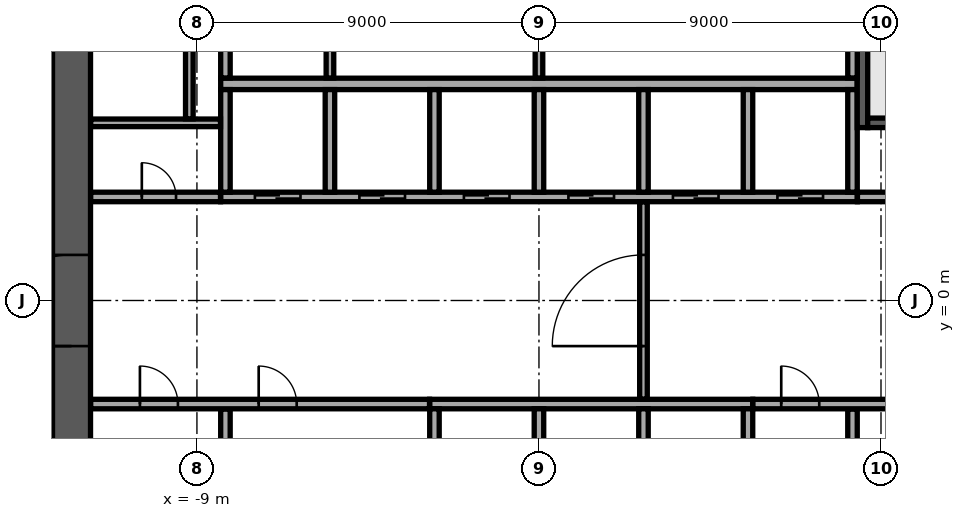
"""IFC4 building model, lengths in metres.
Left out: names, types, materials, properties, quantities, classifications, styles, units other than length and angle.
Written with IfcOpenShell. Run it as: python <this file> out.ifc"""

import sys

from ifc_helpers import new_model, si_unit, direction, frame, frame_2d, origin, place, context, subcontext, project, spatial, rectangle, extrude, element, fill, save


model = new_model("IFC4")
c1 = context("Model", 3, precision=1e-05, world=origin(), true_north=direction((0.0, 1.0)))
c2 = subcontext(c1, "Body", "Model", "MODEL_VIEW")
j1 = project(units=[si_unit("LENGTHUNIT", "METRE"), si_unit("PLANEANGLEUNIT", "RADIAN")], contexts=[c1])
p1 = place(None, origin())
s1 = spatial("IfcSite", under=j1, at=p1, CompositionType="ELEMENT")
p2 = place(p1, origin())
s2 = spatial("IfcBuilding", under=s1, at=p2, CompositionType="ELEMENT")
p3 = place(p2, frame((0.0, 0.0, 139.7)))
s3 = spatial("IfcBuildingStorey", under=s2, at=p3, CompositionType="ELEMENT", Elevation=139.7)
p4 = place(p3, frame((-12.3, -11.8, 0.0), z_axis=(0.0, 0.0, 1.0), x_axis=(0.0, 1.0, 0.0)))
e1 = element("IfcWall", 1, at=p4, inside=s3, PredefinedType="SHEAR", context=c2, shape_type="SweptSolid", body=[
    extrude(rectangle(XDim=23.6, YDim=1.0, at=frame_2d((11.8, 0.0))), origin(), (0.0, 0.0, 1.0), 3.6),
])
p5 = place(p4, frame((10.6, 0.0, 0.0)))
e2 = element("IfcOpeningElement", 2, at=p5, cuts=e1, PredefinedType="OPENING", context=c2, shape_type="SweptSolid", body=[
    extrude(rectangle(XDim=2.4, YDim=2.4, at=frame_2d((1.2, 1.2))), frame((0.0, 0.51, 0.0), z_axis=(0.0, -1.0, 0.0), x_axis=(1.0, 0.0, 0.0)), (0.0, 0.0, 1.0), 1.02),
])
p6 = place(p3, frame((-8.375, 5.7, 0.0), z_axis=(0.0, 0.0, 1.0), x_axis=(1.0, 0.0, 0.0)))
e3 = element("IfcWall", 3, at=p6, inside=s3, PredefinedType="SOLIDWALL", context=c2, shape_type="SweptSolid", body=[
    extrude(rectangle(XDim=16.75, YDim=0.3, at=frame_2d((8.375, 0.0))), origin(), (0.0, 0.0, 1.0), 3.6),
])
p7 = place(p3, frame((-8.375, 2.725, 0.0), z_axis=(0.0, 0.0, 1.0), x_axis=(1.0, 0.0, 0.0)))
e4 = element("IfcWall", 4, at=p7, inside=s3, PredefinedType="SOLIDWALL", context=c2, shape_type="SweptSolid", body=[
    extrude(rectangle(XDim=16.75, YDim=0.25, at=frame_2d((8.375, 0.0))), origin(), (0.0, 0.0, 1.0), 3.6),
])
p8 = place(p7, frame((0.9, 0.0, 0.0)))
e5 = element("IfcOpeningElement", 5, at=p8, cuts=e4, PredefinedType="OPENING", context=c2, shape_type="SweptSolid", body=[
    extrude(rectangle(XDim=1.2, YDim=2.1, at=frame_2d((0.6, 1.05))), frame((0.0, 0.135, 0.0), z_axis=(0.0, -1.0, 0.0), x_axis=(1.0, 0.0, 0.0)), (0.0, 0.0, 1.0), 0.27),
])
p9 = place(p7, frame((3.65, 0.0, 0.0)))
e6 = element("IfcOpeningElement", 6, at=p9, cuts=e4, PredefinedType="OPENING", context=c2, shape_type="SweptSolid", body=[
    extrude(rectangle(XDim=1.2, YDim=2.1, at=frame_2d((0.6, 1.05))), frame((0.0, 0.135, 0.0), z_axis=(0.0, -1.0, 0.0), x_axis=(1.0, 0.0, 0.0)), (0.0, 0.0, 1.0), 0.27),
])
p10 = place(p7, frame((6.4, 0.0, 0.0)))
e7 = element("IfcOpeningElement", 7, at=p10, cuts=e4, PredefinedType="OPENING", context=c2, shape_type="SweptSolid", body=[
    extrude(rectangle(XDim=1.2, YDim=2.1, at=frame_2d((0.6, 1.05))), frame((0.0, 0.135, 0.0), z_axis=(0.0, -1.0, 0.0), x_axis=(1.0, 0.0, 0.0)), (0.0, 0.0, 1.0), 0.27),
])
p11 = place(p7, frame((9.15, 0.0, 0.0)))
e8 = element("IfcOpeningElement", 8, at=p11, cuts=e4, PredefinedType="OPENING", context=c2, shape_type="SweptSolid", body=[
    extrude(rectangle(XDim=1.2, YDim=2.1, at=frame_2d((0.6, 1.05))), frame((0.0, 0.135, 0.0), z_axis=(0.0, -1.0, 0.0), x_axis=(1.0, 0.0, 0.0)), (0.0, 0.0, 1.0), 0.27),
])
p12 = place(p7, frame((11.9, 0.0, 0.0)))
e9 = element("IfcOpeningElement", 9, at=p12, cuts=e4, PredefinedType="OPENING", context=c2, shape_type="SweptSolid", body=[
    extrude(rectangle(XDim=1.2, YDim=2.1, at=frame_2d((0.6, 1.05))), frame((0.0, 0.135, 0.0), z_axis=(0.0, -1.0, 0.0), x_axis=(1.0, 0.0, 0.0)), (0.0, 0.0, 1.0), 0.27),
])
p13 = place(p7, frame((14.65, 0.0, 0.0)))
e10 = element("IfcOpeningElement", 10, at=p13, cuts=e4, PredefinedType="OPENING", context=c2, shape_type="SweptSolid", body=[
    extrude(rectangle(XDim=1.2, YDim=2.1, at=frame_2d((0.6, 1.05))), frame((0.0, 0.135, 0.0), z_axis=(0.0, -1.0, 0.0), x_axis=(1.0, 0.0, 0.0)), (0.0, 0.0, 1.0), 0.27),
])
for number, where, z_axis, x_axis in (
    (11, (-8.25, 2.85, 0.0), (0.0, 0.0, 1.0), (0.0, 1.0, 0.0)),
    (12, (-5.5, 2.85, 0.0), (0.0, 0.0, 1.0), (0.0, 1.0, 0.0)),
    (13, (-2.75, 2.85, 0.0), (0.0, 0.0, 1.0), (0.0, 1.0, 0.0)),
    (14, (0.0, 2.85, 0.0), (0.0, 0.0, 1.0), (0.0, 1.0, 0.0)),
    (15, (2.75, 2.85, 0.0), (0.0, 0.0, 1.0), (0.0, 1.0, 0.0)),
    (16, (5.5, 2.85, 0.0), (0.0, 0.0, 1.0), (0.0, 1.0, 0.0)),
    (17, (8.25, 2.85, 0.0), (0.0, 0.0, 1.0), (0.0, 1.0, 0.0)),
):
    element("IfcWall", number, at=place(p3, frame(where, z_axis=z_axis, x_axis=x_axis)), inside=s3, PredefinedType="SOLIDWALL", context=c2, shape_type="SweptSolid", body=[
        extrude(rectangle(XDim=2.7, YDim=0.25, at=frame_2d((1.35, 0.0))), origin(), (0.0, 0.0, 1.0), 3.6),
    ])
p14 = place(p3, frame((-2.875, -2.725, 0.0), z_axis=(0.0, 0.0, 1.0), x_axis=(1.0, 0.0, 0.0)))
e18 = element("IfcWall", 18, at=p14, inside=s3, PredefinedType="SOLIDWALL", context=c2, shape_type="SweptSolid", body=[
    extrude(rectangle(XDim=8.5, YDim=0.25, at=frame_2d((4.25, 0.0))), origin(), (0.0, 0.0, 1.0), 3.6),
])
for number, where, z_axis, x_axis in (
    (19, (-2.75, -5.55, 0.0), (0.0, 0.0, 1.0), (0.0, 1.0, 0.0)),
    (20, (0.0, -5.55, 0.0), (0.0, 0.0, 1.0), (0.0, 1.0, 0.0)),
    (21, (2.75, -5.55, 0.0), (0.0, 0.0, 1.0), (0.0, 1.0, 0.0)),
    (22, (5.5, -5.55, 0.0), (0.0, 0.0, 1.0), (0.0, 1.0, 0.0)),
):
    element("IfcWall", number, at=place(p3, frame(where, z_axis=z_axis, x_axis=x_axis)), inside=s3, PredefinedType="SOLIDWALL", context=c2, shape_type="SweptSolid", body=[
        extrude(rectangle(XDim=2.7, YDim=0.25, at=frame_2d((1.35, 0.0))), origin(), (0.0, 0.0, 1.0), 3.6),
    ])
p15 = place(p3, frame((8.512, 4.55, 0.0), z_axis=(0.0, 0.0, 1.0), x_axis=(0.0, 1.0, 0.0)))
e23 = element("IfcWall", 23, at=p15, inside=s3, PredefinedType="SOLIDWALL", context=c2, shape_type="SweptSolid", body=[
    extrude(rectangle(XDim=7.25, YDim=0.275, at=frame_2d((3.625, 0.0))), origin(), (0.0, 0.0, 1.0), 3.6),
])
p16 = place(p15, frame((6.0, 0.0, 0.0)))
e24 = element("IfcOpeningElement", 24, at=p16, cuts=e23, PredefinedType="OPENING", context=c2, shape_type="SweptSolid", body=[
    extrude(rectangle(XDim=1.0, YDim=2.1, at=frame_2d((0.5, 1.05))), frame((0.0, 0.147, 0.0), z_axis=(0.0, -1.0, 0.0), x_axis=(1.0, 0.0, 0.0)), (0.0, 0.0, 1.0), 0.295),
])
p17 = place(p3, frame((8.65, 4.675, 0.0), z_axis=(0.0, 0.0, 1.0), x_axis=(1.0, 0.0, 0.0)))
e25 = element("IfcWall", 25, at=p17, inside=s3, PredefinedType="SOLIDWALL", context=c2, shape_type="SweptSolid", body=[
    extrude(rectangle(XDim=3.15, YDim=0.25, at=frame_2d((1.575, 0.0))), origin(), (0.0, 0.0, 1.0), 3.6),
])
for number, where, z_axis, x_axis in (
    (26, (-8.25, -5.545, 0.0), (0.0, 0.0, 1.0), (0.0, 1.0, 0.0)),
    (27, (8.25, -5.545, 0.0), (0.0, 0.0, 1.0), (0.0, 1.0, 0.0)),
):
    element("IfcWall", number, at=place(p3, frame(where, z_axis=z_axis, x_axis=x_axis)), inside=s3, PredefinedType="PARTITIONING", context=c2, shape_type="SweptSolid", body=[
        extrude(rectangle(XDim=2.69, YDim=0.25, at=frame_2d((1.345, 0.0))), origin(), (0.0, 0.0, 1.0), 3.6),
    ])
p18 = place(p3, frame((-11.795, -2.725, 0.0), z_axis=(0.0, 0.0, 1.0), x_axis=(1.0, 0.0, 0.0)))
e28 = element("IfcWall", 28, at=p18, inside=s3, PredefinedType="PARTITIONING", context=c2, shape_type="SweptSolid", body=[
    extrude(rectangle(XDim=8.915, YDim=0.25, at=frame_2d((4.458, 0.0))), origin(), (0.0, 0.0, 1.0), 3.6),
])
p19 = place(p18, frame((1.295, 0.0, 0.0)))
e29 = element("IfcOpeningElement", 29, at=p19, cuts=e28, PredefinedType="OPENING", context=c2, shape_type="SweptSolid", body=[
    extrude(rectangle(XDim=1.0, YDim=2.1, at=frame_2d((0.5, 1.05))), frame((0.0, 0.135, 0.0), z_axis=(0.0, -1.0, 0.0), x_axis=(1.0, 0.0, 0.0)), (0.0, 0.0, 1.0), 0.27),
])
p20 = place(p18, frame((4.42, 0.0, 0.0)))
e30 = element("IfcOpeningElement", 30, at=p20, cuts=e28, PredefinedType="OPENING", context=c2, shape_type="SweptSolid", body=[
    extrude(rectangle(XDim=1.0, YDim=2.1, at=frame_2d((0.5, 1.05))), frame((0.0, 0.135, 0.0), z_axis=(0.0, -1.0, 0.0), x_axis=(1.0, 0.0, 0.0)), (0.0, 0.0, 1.0), 0.27),
])
p21 = place(p3, frame((5.63, -2.725, 0.0), z_axis=(0.0, 0.0, 1.0), x_axis=(1.0, 0.0, 0.0)))
e31 = element("IfcWall", 31, at=p21, inside=s3, PredefinedType="PARTITIONING", context=c2, shape_type="SweptSolid", body=[
    extrude(rectangle(XDim=6.165, YDim=0.25, at=frame_2d((3.083, 0.0))), origin(), (0.0, 0.0, 1.0), 3.6),
])
p22 = place(p21, frame((0.745, 0.0, 0.0)))
e32 = element("IfcOpeningElement", 32, at=p22, cuts=e31, PredefinedType="OPENING", context=c2, shape_type="SweptSolid", body=[
    extrude(rectangle(XDim=1.0, YDim=2.1, at=frame_2d((0.5, 1.05))), frame((0.0, 0.135, 0.0), z_axis=(0.0, -1.0, 0.0), x_axis=(1.0, 0.0, 0.0)), (0.0, 0.0, 1.0), 0.27),
])
p23 = place(p21, frame((3.92, 0.0, 0.0)))
e33 = element("IfcOpeningElement", 33, at=p23, cuts=e31, PredefinedType="OPENING", context=c2, shape_type="SweptSolid", body=[
    extrude(rectangle(XDim=0.9, YDim=2.1, at=frame_2d((0.45, 1.05))), frame((0.0, 0.135, 0.0), z_axis=(0.0, -1.0, 0.0), x_axis=(1.0, 0.0, 0.0)), (0.0, 0.0, 1.0), 0.27),
])
p24 = place(p3, frame((2.75, -2.595, 0.0), z_axis=(0.0, 0.0, 1.0), x_axis=(0.0, 1.0, 0.0)))
e34 = element("IfcWall", 34, at=p24, inside=s3, PredefinedType="PARTITIONING", context=c2, shape_type="SweptSolid", body=[
    extrude(rectangle(XDim=5.19, YDim=0.2, at=frame_2d((2.595, 0.0))), origin(), (0.0, 0.0, 1.0), 3.6),
])
p25 = place(p24, frame((1.395, 0.0, 0.0)))
e35 = element("IfcOpeningElement", 35, at=p25, cuts=e34, PredefinedType="OPENING", context=c2, shape_type="SweptSolid", body=[
    extrude(rectangle(XDim=2.4, YDim=2.4, at=frame_2d((1.2, 1.2))), frame((0.0, 0.11, 0.0), z_axis=(0.0, -1.0, 0.0), x_axis=(1.0, 0.0, 0.0)), (0.0, 0.0, 1.0), 0.22),
])
p26 = place(p3, frame((-11.795, 2.725, 0.0), z_axis=(0.0, 0.0, 1.0), x_axis=(1.0, 0.0, 0.0)))
e36 = element("IfcWall", 36, at=p26, inside=s3, PredefinedType="PARTITIONING", context=c2, shape_type="SweptSolid", body=[
    extrude(rectangle(XDim=3.415, YDim=0.25, at=frame_2d((1.708, 0.0))), origin(), (0.0, 0.0, 1.0), 3.6),
])
p27 = place(p26, frame((1.345, 0.0, 0.0)))
e37 = element("IfcOpeningElement", 37, at=p27, cuts=e36, PredefinedType="OPENING", context=c2, shape_type="SweptSolid", body=[
    extrude(rectangle(XDim=0.9, YDim=2.1, at=frame_2d((0.45, 1.05))), frame((0.0, 0.135, 0.0), z_axis=(0.0, -1.0, 0.0), x_axis=(1.0, 0.0, 0.0)), (0.0, 0.0, 1.0), 0.27),
])
p28 = place(p3, frame((8.38, 2.725, 0.0), z_axis=(0.0, 0.0, 1.0), x_axis=(1.0, 0.0, 0.0)))
e38 = element("IfcWall", 38, at=p28, inside=s3, PredefinedType="PARTITIONING", context=c2, shape_type="SweptSolid", body=[
    extrude(rectangle(XDim=3.415, YDim=0.25, at=frame_2d((1.708, 0.0))), origin(), (0.0, 0.0, 1.0), 3.6),
])
p29 = place(p28, frame((1.17, 0.0, 0.0)))
e39 = element("IfcOpeningElement", 39, at=p29, cuts=e38, PredefinedType="OPENING", context=c2, shape_type="SweptSolid", body=[
    extrude(rectangle(XDim=0.9, YDim=2.1, at=frame_2d((0.45, 1.05))), frame((0.0, 0.135, 0.0), z_axis=(0.0, -1.0, 0.0), x_axis=(1.0, 0.0, 0.0)), (0.0, 0.0, 1.0), 0.27),
])
p30 = place(p3, frame((-11.795, 4.675, 0.0), z_axis=(0.0, 0.0, 1.0), x_axis=(1.0, 0.0, 0.0)))
e40 = element("IfcWall", 40, at=p30, inside=s3, PredefinedType="PARTITIONING", context=c2, shape_type="SweptSolid", body=[
    extrude(rectangle(XDim=3.415, YDim=0.2, at=frame_2d((1.708, 0.0))), origin(), (0.0, 0.0, 1.0), 3.6),
])
p31 = place(p3, frame((-9.2, 4.78, 0.0), z_axis=(0.0, 0.0, 1.0), x_axis=(0.0, 1.0, 0.0)))
e41 = element("IfcWall", 41, at=p31, inside=s3, PredefinedType="PARTITIONING", context=c2, shape_type="SweptSolid", body=[
    extrude(rectangle(XDim=7.015, YDim=0.2, at=frame_2d((3.507, 0.0))), origin(), (0.0, 0.0, 1.0), 3.6),
])
p32 = place(p31, frame((2.92, 0.0, 0.0)))
e42 = element("IfcOpeningElement", 42, at=p32, cuts=e41, PredefinedType="OPENING", context=c2, shape_type="SweptSolid", body=[
    extrude(rectangle(XDim=1.0, YDim=2.1, at=frame_2d((0.5, 1.05))), frame((0.0, 0.11, 0.0), z_axis=(0.0, -1.0, 0.0), x_axis=(1.0, 0.0, 0.0)), (0.0, 0.0, 1.0), 0.22),
])
p33 = place(p3, frame((-8.25, 5.855, 0.0), z_axis=(0.0, 0.0, 1.0), x_axis=(0.0, 1.0, 0.0)))
e43 = element("IfcWall", 43, at=p33, inside=s3, PredefinedType="PARTITIONING", context=c2, shape_type="SweptSolid", body=[
    extrude(rectangle(XDim=2.69, YDim=0.25, at=frame_2d((1.345, 0.0))), origin(), (0.0, 0.0, 1.0), 3.6),
])
for number, where, z_axis, x_axis in (
    (44, (-5.5, 5.855, 0.0), (0.0, 0.0, 1.0), (0.0, 1.0, 0.0)),
    (45, (0.0, 5.855, 0.0), (0.0, 0.0, 1.0), (0.0, 1.0, 0.0)),
):
    element("IfcWall", number, at=place(p3, frame(where, z_axis=z_axis, x_axis=x_axis)), inside=s3, PredefinedType="PARTITIONING", context=c2, shape_type="SweptSolid", body=[
        extrude(rectangle(XDim=2.69, YDim=0.2, at=frame_2d((1.345, 0.0))), origin(), (0.0, 0.0, 1.0), 3.6),
    ])
p34 = place(p3, frame((8.25, 5.855, 0.0), z_axis=(0.0, 0.0, 1.0), x_axis=(0.0, 1.0, 0.0)))
e46 = element("IfcWall", 46, at=p34, inside=s3, PredefinedType="PARTITIONING", context=c2, shape_type="SweptSolid", body=[
    extrude(rectangle(XDim=2.69, YDim=0.25, at=frame_2d((1.345, 0.0))), origin(), (0.0, 0.0, 1.0), 3.6),
])
p35 = place(p5, origin())
e47 = element("IfcDoor", 47, at=p35, inside=s3, OperationType="SINGLE_SWING_LEFT", PredefinedType="DOOR", context=c2, shape_type="SweptSolid", body=[
    extrude(rectangle(XDim=2.4, YDim=2.4, at=frame_2d((1.2, 1.2))), frame((0.0, 0.025, 0.0), z_axis=(0.0, -1.0, 0.0), x_axis=(1.0, 0.0, 0.0)), (0.0, 0.0, 1.0), 0.05),
])
fill(e2, e47)
p36 = place(p8, origin())
e48 = element("IfcDoor", 48, at=p36, inside=s3, OperationType="DOUBLE_DOOR_SLIDING", PredefinedType="DOOR", context=c2, shape_type="SweptSolid", body=[
    extrude(rectangle(XDim=1.2, YDim=2.1, at=frame_2d((0.6, 1.05))), frame((0.0, 0.025, 0.0), z_axis=(0.0, -1.0, 0.0), x_axis=(1.0, 0.0, 0.0)), (0.0, 0.0, 1.0), 0.05),
])
fill(e5, e48)
p37 = place(p9, origin())
e49 = element("IfcDoor", 49, at=p37, inside=s3, OperationType="DOUBLE_DOOR_SLIDING", PredefinedType="DOOR", context=c2, shape_type="SweptSolid", body=[
    extrude(rectangle(XDim=1.2, YDim=2.1, at=frame_2d((0.6, 1.05))), frame((0.0, 0.025, 0.0), z_axis=(0.0, -1.0, 0.0), x_axis=(1.0, 0.0, 0.0)), (0.0, 0.0, 1.0), 0.05),
])
fill(e6, e49)
p38 = place(p10, origin())
e50 = element("IfcDoor", 50, at=p38, inside=s3, OperationType="DOUBLE_DOOR_SLIDING", PredefinedType="DOOR", context=c2, shape_type="SweptSolid", body=[
    extrude(rectangle(XDim=1.2, YDim=2.1, at=frame_2d((0.6, 1.05))), frame((0.0, 0.025, 0.0), z_axis=(0.0, -1.0, 0.0), x_axis=(1.0, 0.0, 0.0)), (0.0, 0.0, 1.0), 0.05),
])
fill(e7, e50)
p39 = place(p11, origin())
e51 = element("IfcDoor", 51, at=p39, inside=s3, OperationType="DOUBLE_DOOR_SLIDING", PredefinedType="DOOR", context=c2, shape_type="SweptSolid", body=[
    extrude(rectangle(XDim=1.2, YDim=2.1, at=frame_2d((0.6, 1.05))), frame((0.0, 0.025, 0.0), z_axis=(0.0, -1.0, 0.0), x_axis=(1.0, 0.0, 0.0)), (0.0, 0.0, 1.0), 0.05),
])
fill(e8, e51)
p40 = place(p12, origin())
e52 = element("IfcDoor", 52, at=p40, inside=s3, OperationType="DOUBLE_DOOR_SLIDING", PredefinedType="DOOR", context=c2, shape_type="SweptSolid", body=[
    extrude(rectangle(XDim=1.2, YDim=2.1, at=frame_2d((0.6, 1.05))), frame((0.0, 0.025, 0.0), z_axis=(0.0, -1.0, 0.0), x_axis=(1.0, 0.0, 0.0)), (0.0, 0.0, 1.0), 0.05),
])
fill(e9, e52)
p41 = place(p13, origin())
e53 = element("IfcDoor", 53, at=p41, inside=s3, OperationType="DOUBLE_DOOR_SLIDING", PredefinedType="DOOR", context=c2, shape_type="SweptSolid", body=[
    extrude(rectangle(XDim=1.2, YDim=2.1, at=frame_2d((0.6, 1.05))), frame((0.0, 0.025, 0.0), z_axis=(0.0, -1.0, 0.0), x_axis=(1.0, 0.0, 0.0)), (0.0, 0.0, 1.0), 0.05),
])
fill(e10, e53)
p42 = place(p19, origin())
e54 = element("IfcDoor", 54, at=p42, inside=s3, OperationType="SINGLE_SWING_LEFT", PredefinedType="DOOR", context=c2, shape_type="SweptSolid", body=[
    extrude(rectangle(XDim=1.0, YDim=2.1, at=frame_2d((0.5, 1.05))), frame((0.0, 0.025, 0.0), z_axis=(0.0, -1.0, 0.0), x_axis=(1.0, 0.0, 0.0)), (0.0, 0.0, 1.0), 0.05),
])
fill(e29, e54)
p43 = place(p22, origin())
e55 = element("IfcDoor", 55, at=p43, inside=s3, OperationType="SINGLE_SWING_LEFT", PredefinedType="DOOR", context=c2, shape_type="SweptSolid", body=[
    extrude(rectangle(XDim=1.0, YDim=2.1, at=frame_2d((0.5, 1.05))), frame((0.0, 0.025, 0.0), z_axis=(0.0, -1.0, 0.0), x_axis=(1.0, 0.0, 0.0)), (0.0, 0.0, 1.0), 0.05),
])
fill(e32, e55)
p44 = place(p27, origin())
e56 = element("IfcDoor", 56, at=p44, inside=s3, OperationType="SINGLE_SWING_LEFT", PredefinedType="DOOR", context=c2, shape_type="SweptSolid", body=[
    extrude(rectangle(XDim=0.9, YDim=2.1, at=frame_2d((0.45, 1.05))), frame((0.0, 0.025, 0.0), z_axis=(0.0, -1.0, 0.0), x_axis=(1.0, 0.0, 0.0)), (0.0, 0.0, 1.0), 0.05),
])
fill(e37, e56)
p45 = place(p20, origin())
e57 = element("IfcDoor", 57, at=p45, inside=s3, OperationType="SINGLE_SWING_LEFT", PredefinedType="DOOR", context=c2, shape_type="SweptSolid", body=[
    extrude(rectangle(XDim=1.0, YDim=2.1, at=frame_2d((0.5, 1.05))), frame((0.0, 0.025, 0.0), z_axis=(0.0, -1.0, 0.0), x_axis=(1.0, 0.0, 0.0)), (0.0, 0.0, 1.0), 0.05),
])
fill(e30, e57)
p46 = place(p25, origin())
e58 = element("IfcDoor", 58, at=p46, inside=s3, OperationType="SINGLE_SWING_LEFT", PredefinedType="DOOR", context=c2, shape_type="SweptSolid", body=[
    extrude(rectangle(XDim=2.4, YDim=2.4, at=frame_2d((1.2, 1.2))), frame((0.0, 0.025, 0.0), z_axis=(0.0, -1.0, 0.0), x_axis=(1.0, 0.0, 0.0)), (0.0, 0.0, 1.0), 0.05),
])
fill(e35, e58)
save(model, sys.argv[1])
